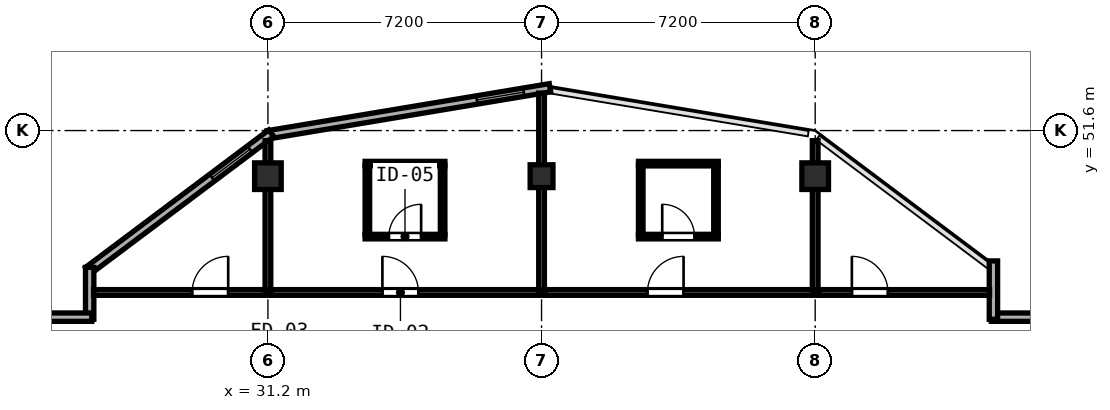
"""IFC4 building model, lengths in metres.
Left out: names, types, materials, properties, quantities, classifications, styles, units other than length and angle.
Written with IfcOpenShell. Run it as: python <this file> out.ifc"""

import sys

from ifc_helpers import new_model, si_unit, direction, frame, frame_2d, origin, origin_2d, place, context, subcontext, project, spatial, rectangle, hollow_rectangle, extrude, element, fill, save


model = new_model("IFC4")
c1 = context("Model", 3, precision=1e-05, world=origin(), true_north=direction((0.0, 1.0)))
c2 = subcontext(c1, "Body", "Model", "MODEL_VIEW")
j1 = project(units=[si_unit("LENGTHUNIT", "METRE"), si_unit("PLANEANGLEUNIT", "RADIAN")], contexts=[c1])
p1 = place(None, origin())
s1 = spatial("IfcSite", under=j1, at=p1, CompositionType="ELEMENT")
p2 = place(p1, origin())
s2 = spatial("IfcBuilding", under=s1, at=p2, CompositionType="ELEMENT")
p3 = place(p2, frame((0.0, 0.0, 293.9)))
s3 = spatial("IfcBuildingStorey", under=s2, at=p3, CompositionType="ELEMENT", Elevation=293.9)
for number, where, z_axis, x_axis in (
    (1, (31.2, 50.4, 0.0), (0.0, 0.0, 1.0), (1.0, 0.0, 0.0)),
    (2, (45.6, 50.4, 0.0), (0.0, 0.0, 1.0), (1.0, 0.0, 0.0)),
):
    element("IfcColumn", number, at=place(p3, frame(where, z_axis=z_axis, x_axis=x_axis)), inside=s3, PredefinedType="COLUMN", context=c2, shape_type="SweptSolid", body=[
        extrude(hollow_rectangle(XDim=0.7, YDim=0.7, WallThickness=0.026, at=origin_2d()), origin(), (0.0, 0.0, 1.0), 3.9),
    ])
p4 = place(p3, frame((38.4, 50.4, 0.0), z_axis=(0.0, 0.0, 1.0), x_axis=(1.0, 0.0, 0.0)))
e3 = element("IfcColumn", 3, at=p4, inside=s3, PredefinedType="COLUMN", context=c2, shape_type="SweptSolid", body=[
    extrude(hollow_rectangle(XDim=0.6, YDim=0.6, WallThickness=0.024, at=origin_2d()), origin(), (0.0, 0.0, 1.0), 3.9),
])
p5 = place(p3, frame((51.545, 46.69, 0.0), z_axis=(0.0, 0.0, 1.0), x_axis=(-1.0, 0.0, 0.0)))
e4 = element("IfcWall", 4, at=p5, inside=s3, PredefinedType="SOLIDWALL", context=c2, shape_type="SweptSolid", body=[
    extrude(rectangle(XDim=1.31, YDim=0.22, at=frame_2d((0.655, 0.0))), origin(), (0.0, 0.0, 1.0), 3.72),
])
p6 = place(p3, frame((50.29, 46.635, 0.0), z_axis=(0.0, 0.0, 1.0), x_axis=(0.0, 1.0, 0.0)))
e5 = element("IfcWall", 5, at=p6, inside=s3, PredefinedType="SOLIDWALL", context=c2, shape_type="SweptSolid", body=[
    extrude(rectangle(XDim=1.535, YDim=0.22, at=frame_2d((0.768, 0.0))), origin(), (0.0, 0.0, 1.0), 3.72),
])
p7 = place(p3, frame((38.622, 52.726, 0.0), z_axis=(0.0, 0.0, 1.0), x_axis=(-0.986390420428, -0.164420006349, 0.0)))
e6 = element("IfcWall", 6, at=p7, inside=s3, PredefinedType="SOLIDWALL", context=c2, shape_type="SweptSolid", body=[
    extrude(rectangle(XDim=7.534, YDim=0.22, at=frame_2d((3.767, 0.0))), origin(), (0.0, 0.0, 1.0), 3.72),
])
p8 = place(p7, frame((0.7, 0.0, 0.85)))
e7 = element("IfcOpeningElement", 7, at=p8, cuts=e6, PredefinedType="OPENING", context=c2, shape_type="SweptSolid", body=[
    extrude(rectangle(XDim=1.25, YDim=1.95, at=frame_2d((0.625, 0.975))), frame((0.0, 0.12, 0.0), z_axis=(0.0, -1.0, 0.0), x_axis=(1.0, 0.0, 0.0)), (0.0, 0.0, 1.0), 0.24),
])
p9 = place(p3, frame((31.289, 51.529, 0.0), z_axis=(0.0, 0.0, 1.0), x_axis=(-0.800014580093, -0.599980559383, 0.0)))
e8 = element("IfcWall", 8, at=p9, inside=s3, PredefinedType="SOLIDWALL", context=c2, shape_type="SweptSolid", body=[
    extrude(rectangle(XDim=6.028, YDim=0.22, at=frame_2d((3.014, 0.0))), origin(), (0.0, 0.0, 1.0), 3.72),
])
p10 = place(p9, frame((0.7, 0.0, 0.85)))
e9 = element("IfcOpeningElement", 9, at=p10, cuts=e8, PredefinedType="OPENING", context=c2, shape_type="SweptSolid", body=[
    extrude(rectangle(XDim=1.25, YDim=1.95, at=frame_2d((0.625, 0.975))), frame((0.0, 0.12, 0.0), z_axis=(0.0, -1.0, 0.0), x_axis=(1.0, 0.0, 0.0)), (0.0, 0.0, 1.0), 0.24),
])
p11 = place(p3, frame((26.51, 48.0, 0.0), z_axis=(0.0, 0.0, 1.0), x_axis=(0.0, -1.0, 0.0)))
e10 = element("IfcWall", 10, at=p11, inside=s3, PredefinedType="SOLIDWALL", context=c2, shape_type="SweptSolid", body=[
    extrude(rectangle(XDim=1.365, YDim=0.22, at=frame_2d((0.683, 0.0))), origin(), (0.0, 0.0, 1.0), 3.72),
])
p12 = place(p3, frame((26.565, 46.69, 0.0), z_axis=(0.0, 0.0, 1.0), x_axis=(-1.0, 0.0, 0.0)))
e11 = element("IfcWall", 11, at=p12, inside=s3, PredefinedType="SOLIDWALL", context=c2, shape_type="SweptSolid", body=[
    extrude(rectangle(XDim=1.31, YDim=0.22, at=frame_2d((0.655, 0.0))), origin(), (0.0, 0.0, 1.0), 3.72),
])
p13 = place(p3, frame((26.612, 47.34, 0.0), z_axis=(0.0, 0.0, 1.0), x_axis=(1.0, 0.0, 0.0)))
e12 = element("IfcWall", 12, at=p13, inside=s3, PredefinedType="PARTITIONING", context=c2, shape_type="SweptSolid", body=[
    extrude(rectangle(XDim=4.668, YDim=0.15, at=frame_2d((2.334, 0.0))), origin(), (0.0, 0.0, 1.0), 3.72),
])
p14 = place(p13, frame((2.593, 0.0, 0.0)))
e13 = element("IfcOpeningElement", 13, at=p14, cuts=e12, PredefinedType="OPENING", context=c2, shape_type="SweptSolid", body=[
    extrude(rectangle(XDim=0.95, YDim=2.12, at=frame_2d((0.475, 1.06))), frame((0.0, 0.085, 0.0), z_axis=(0.0, -1.0, 0.0), x_axis=(1.0, 0.0, 0.0)), (0.0, 0.0, 1.0), 0.17),
])
p15 = place(p3, frame((31.2, 47.4, 0.0), z_axis=(0.0, 0.0, 1.0), x_axis=(0.0, 1.0, 0.0)))
e14 = element("IfcWall", 14, at=p15, inside=s3, PredefinedType="PARTITIONING", context=c2, shape_type="SweptSolid", body=[
    extrude(rectangle(XDim=3.935, YDim=0.15, at=frame_2d((1.968, 0.0))), origin(), (0.0, 0.0, 1.0), 3.255),
])
p16 = place(p3, frame((31.282, 47.34, 0.0), z_axis=(0.0, 0.0, 1.0), x_axis=(1.0, 0.0, 0.0)))
e15 = element("IfcWall", 15, at=p16, inside=s3, PredefinedType="PARTITIONING", context=c2, shape_type="SweptSolid", body=[
    extrude(rectangle(XDim=7.218, YDim=0.15, at=frame_2d((3.609, 0.0))), origin(), (0.0, 0.0, 1.0), 3.72),
])
p17 = place(p16, frame((2.93, 0.0, 0.0)))
e16 = element("IfcOpeningElement", 16, at=p17, cuts=e15, PredefinedType="OPENING", context=c2, shape_type="SweptSolid", body=[
    extrude(rectangle(XDim=0.95, YDim=2.15, at=frame_2d((0.475, 1.075))), frame((0.0, 0.085, 0.0), z_axis=(0.0, -1.0, 0.0), x_axis=(1.0, 0.0, 0.0)), (0.0, 0.0, 1.0), 0.17),
])
p18 = place(p3, frame((38.4, 47.4, 0.0), z_axis=(0.0, 0.0, 1.0), x_axis=(0.0, 1.0, 0.0)))
e17 = element("IfcWall", 17, at=p18, inside=s3, PredefinedType="PARTITIONING", context=c2, shape_type="SweptSolid", body=[
    extrude(rectangle(XDim=5.185, YDim=0.15, at=frame_2d((2.593, 0.0))), origin(), (0.0, 0.0, 1.0), 3.72),
])
p19 = place(p3, frame((33.757, 50.73, 0.0), z_axis=(0.0, 0.0, 1.0), x_axis=(1.0, 0.0, 0.0)))
e18 = element("IfcWall", 18, at=p19, inside=s3, PredefinedType="PARTITIONING", context=c2, shape_type="SweptSolid", body=[
    extrude(rectangle(XDim=2.1, YDim=0.12, at=frame_2d((1.05, 0.0))), origin(), (0.0, 0.0, 1.0), 3.72),
])
p20 = place(p3, frame((33.757, 48.81, 0.0), z_axis=(0.0, 0.0, 1.0), x_axis=(1.0, 0.0, 0.0)))
e19 = element("IfcWall", 19, at=p20, inside=s3, PredefinedType="PARTITIONING", context=c2, shape_type="SweptSolid", body=[
    extrude(rectangle(XDim=2.1, YDim=0.12, at=frame_2d((1.05, 0.0))), origin(), (0.0, 0.0, 1.0), 3.72),
])
p21 = place(p20, frame((0.625, 0.0, 0.0)))
e20 = element("IfcOpeningElement", 20, at=p21, cuts=e19, PredefinedType="OPENING", context=c2, shape_type="SweptSolid", body=[
    extrude(rectangle(XDim=0.85, YDim=2.1, at=frame_2d((0.425, 1.05))), frame((0.0, 0.07, 0.0), z_axis=(0.0, -1.0, 0.0), x_axis=(1.0, 0.0, 0.0)), (0.0, 0.0, 1.0), 0.14),
])
for number, where, z_axis, x_axis in (
    (21, (33.817, 48.855, 0.0), (0.0, 0.0, 1.0), (0.0, 1.0, 0.0)),
    (22, (35.797, 48.855, 0.0), (0.0, 0.0, 1.0), (0.0, 1.0, 0.0)),
):
    element("IfcWall", number, at=place(p3, frame(where, z_axis=z_axis, x_axis=x_axis)), inside=s3, PredefinedType="PARTITIONING", context=c2, shape_type="SweptSolid", body=[
        extrude(rectangle(XDim=1.83, YDim=0.12, at=frame_2d((0.915, 0.0))), origin(), (0.0, 0.0, 1.0), 3.72),
    ])
p22 = place(p3, frame((38.502, 47.34, 0.0), z_axis=(0.0, 0.0, 1.0), x_axis=(1.0, 0.0, 0.0)))
e23 = element("IfcWall", 23, at=p22, inside=s3, PredefinedType="PARTITIONING", context=c2, shape_type="SweptSolid", body=[
    extrude(rectangle(XDim=7.198, YDim=0.15, at=frame_2d((3.599, 0.0))), origin(), (0.0, 0.0, 1.0), 3.72),
])
p23 = place(p22, frame((2.685, 0.0, 0.0)))
e24 = element("IfcOpeningElement", 24, at=p23, cuts=e23, PredefinedType="OPENING", context=c2, shape_type="SweptSolid", body=[
    extrude(rectangle(XDim=0.95, YDim=2.15, at=frame_2d((0.475, 1.075))), frame((0.0, 0.085, 0.0), z_axis=(0.0, -1.0, 0.0), x_axis=(1.0, 0.0, 0.0)), (0.0, 0.0, 1.0), 0.17),
])
p24 = place(p3, frame((45.6, 47.4, 0.0), z_axis=(0.0, 0.0, 1.0), x_axis=(0.0, 1.0, 0.0)))
e25 = element("IfcWall", 25, at=p24, inside=s3, PredefinedType="PARTITIONING", context=c2, shape_type="SweptSolid", body=[
    extrude(rectangle(XDim=3.935, YDim=0.15, at=frame_2d((1.968, 0.0))), origin(), (0.0, 0.0, 1.0), 3.255),
])
p25 = place(p3, frame((40.95, 50.73, 0.0), z_axis=(0.0, 0.0, 1.0), x_axis=(1.0, 0.0, 0.0)))
e26 = element("IfcWall", 26, at=p25, inside=s3, PredefinedType="PARTITIONING", context=c2, shape_type="SweptSolid", body=[
    extrude(rectangle(XDim=2.1, YDim=0.12, at=frame_2d((1.05, 0.0))), origin(), (0.0, 0.0, 1.0), 3.72),
])
p26 = place(p3, frame((40.95, 48.81, 0.0), z_axis=(0.0, 0.0, 1.0), x_axis=(1.0, 0.0, 0.0)))
e27 = element("IfcWall", 27, at=p26, inside=s3, PredefinedType="PARTITIONING", context=c2, shape_type="SweptSolid", body=[
    extrude(rectangle(XDim=2.1, YDim=0.12, at=frame_2d((1.05, 0.0))), origin(), (0.0, 0.0, 1.0), 3.72),
])
p27 = place(p26, frame((0.625, 0.0, 0.0)))
e28 = element("IfcOpeningElement", 28, at=p27, cuts=e27, PredefinedType="OPENING", context=c2, shape_type="SweptSolid", body=[
    extrude(rectangle(XDim=0.85, YDim=2.1, at=frame_2d((0.425, 1.05))), frame((0.0, 0.07, 0.0), z_axis=(0.0, -1.0, 0.0), x_axis=(1.0, 0.0, 0.0)), (0.0, 0.0, 1.0), 0.14),
])
for number, where, z_axis, x_axis in (
    (29, (41.01, 48.855, 0.0), (0.0, 0.0, 1.0), (0.0, 1.0, 0.0)),
    (30, (42.99, 48.855, 0.0), (0.0, 0.0, 1.0), (0.0, 1.0, 0.0)),
):
    element("IfcWall", number, at=place(p3, frame(where, z_axis=z_axis, x_axis=x_axis)), inside=s3, PredefinedType="PARTITIONING", context=c2, shape_type="SweptSolid", body=[
        extrude(rectangle(XDim=1.83, YDim=0.12, at=frame_2d((0.915, 0.0))), origin(), (0.0, 0.0, 1.0), 3.72),
    ])
p28 = place(p3, frame((45.702, 47.34, 0.0), z_axis=(0.0, 0.0, 1.0), x_axis=(1.0, 0.0, 0.0)))
e31 = element("IfcWall", 31, at=p28, inside=s3, PredefinedType="PARTITIONING", context=c2, shape_type="SweptSolid", body=[
    extrude(rectangle(XDim=4.486, YDim=0.15, at=frame_2d((2.243, 0.0))), origin(), (0.0, 0.0, 1.0), 3.72),
])
p29 = place(p28, frame((0.863, 0.0, 0.0)))
e32 = element("IfcOpeningElement", 32, at=p29, cuts=e31, PredefinedType="OPENING", context=c2, shape_type="SweptSolid", body=[
    extrude(rectangle(XDim=0.95, YDim=2.12, at=frame_2d((0.475, 1.06))), frame((0.0, 0.085, 0.0), z_axis=(0.0, -1.0, 0.0), x_axis=(1.0, 0.0, 0.0)), (0.0, 0.0, 1.0), 0.17),
])
p30 = place(p8, origin())
e33 = element("IfcWindow", 33, at=p30, inside=s3, PartitioningType="SINGLE_PANEL", PredefinedType="WINDOW", context=c2, shape_type="SweptSolid", body=[
    extrude(rectangle(XDim=1.25, YDim=1.95, at=frame_2d((0.625, 0.975))), frame((0.0, 0.03, 0.0), z_axis=(0.0, -1.0, 0.0), x_axis=(1.0, 0.0, 0.0)), (0.0, 0.0, 1.0), 0.06),
])
fill(e7, e33)
p31 = place(p10, origin())
e34 = element("IfcWindow", 34, at=p31, inside=s3, PartitioningType="SINGLE_PANEL", PredefinedType="WINDOW", context=c2, shape_type="SweptSolid", body=[
    extrude(rectangle(XDim=1.25, YDim=1.95, at=frame_2d((0.625, 0.975))), frame((0.0, 0.03, 0.0), z_axis=(0.0, -1.0, 0.0), x_axis=(1.0, 0.0, 0.0)), (0.0, 0.0, 1.0), 0.06),
])
fill(e9, e34)
p32 = place(p14, origin())
e35 = element("IfcDoor", 35, at=p32, inside=s3, OperationType="SINGLE_SWING_RIGHT", PredefinedType="DOOR", context=c2, shape_type="SweptSolid", body=[
    extrude(rectangle(XDim=0.95, YDim=2.12, at=frame_2d((0.475, 1.06))), frame((0.0, 0.025, 0.0), z_axis=(0.0, -1.0, 0.0), x_axis=(1.0, 0.0, 0.0)), (0.0, 0.0, 1.0), 0.05),
])
fill(e13, e35)
p33 = place(p17, origin())
e36 = element("IfcDoor", 36, at=p33, inside=s3, OperationType="SINGLE_SWING_LEFT", PredefinedType="DOOR", context=c2, shape_type="SweptSolid", body=[
    extrude(rectangle(XDim=0.95, YDim=2.15, at=frame_2d((0.475, 1.075))), frame((0.0, 0.025, 0.0), z_axis=(0.0, -1.0, 0.0), x_axis=(1.0, 0.0, 0.0)), (0.0, 0.0, 1.0), 0.05),
])
fill(e16, e36)
p34 = place(p21, origin())
e37 = element("IfcDoor", 37, at=p34, inside=s3, OperationType="SINGLE_SWING_RIGHT", PredefinedType="DOOR", context=c2, shape_type="SweptSolid", body=[
    extrude(rectangle(XDim=0.85, YDim=2.1, at=frame_2d((0.425, 1.05))), frame((0.0, 0.025, 0.0), z_axis=(0.0, -1.0, 0.0), x_axis=(1.0, 0.0, 0.0)), (0.0, 0.0, 1.0), 0.05),
])
fill(e20, e37)
p35 = place(p23, origin())
e38 = element("IfcDoor", 38, at=p35, inside=s3, OperationType="SINGLE_SWING_RIGHT", PredefinedType="DOOR", context=c2, shape_type="SweptSolid", body=[
    extrude(rectangle(XDim=0.95, YDim=2.15, at=frame_2d((0.475, 1.075))), frame((0.0, 0.025, 0.0), z_axis=(0.0, -1.0, 0.0), x_axis=(1.0, 0.0, 0.0)), (0.0, 0.0, 1.0), 0.05),
])
fill(e24, e38)
p36 = place(p27, origin())
e39 = element("IfcDoor", 39, at=p36, inside=s3, OperationType="SINGLE_SWING_LEFT", PredefinedType="DOOR", context=c2, shape_type="SweptSolid", body=[
    extrude(rectangle(XDim=0.85, YDim=2.1, at=frame_2d((0.425, 1.05))), frame((0.0, 0.025, 0.0), z_axis=(0.0, -1.0, 0.0), x_axis=(1.0, 0.0, 0.0)), (0.0, 0.0, 1.0), 0.05),
])
fill(e28, e39)
p37 = place(p29, origin())
e40 = element("IfcDoor", 40, at=p37, inside=s3, OperationType="SINGLE_SWING_LEFT", PredefinedType="DOOR", context=c2, shape_type="SweptSolid", body=[
    extrude(rectangle(XDim=0.95, YDim=2.12, at=frame_2d((0.475, 1.06))), frame((0.0, 0.025, 0.0), z_axis=(0.0, -1.0, 0.0), x_axis=(1.0, 0.0, 0.0)), (0.0, 0.0, 1.0), 0.05),
])
fill(e32, e40)
save(model, sys.argv[1])
